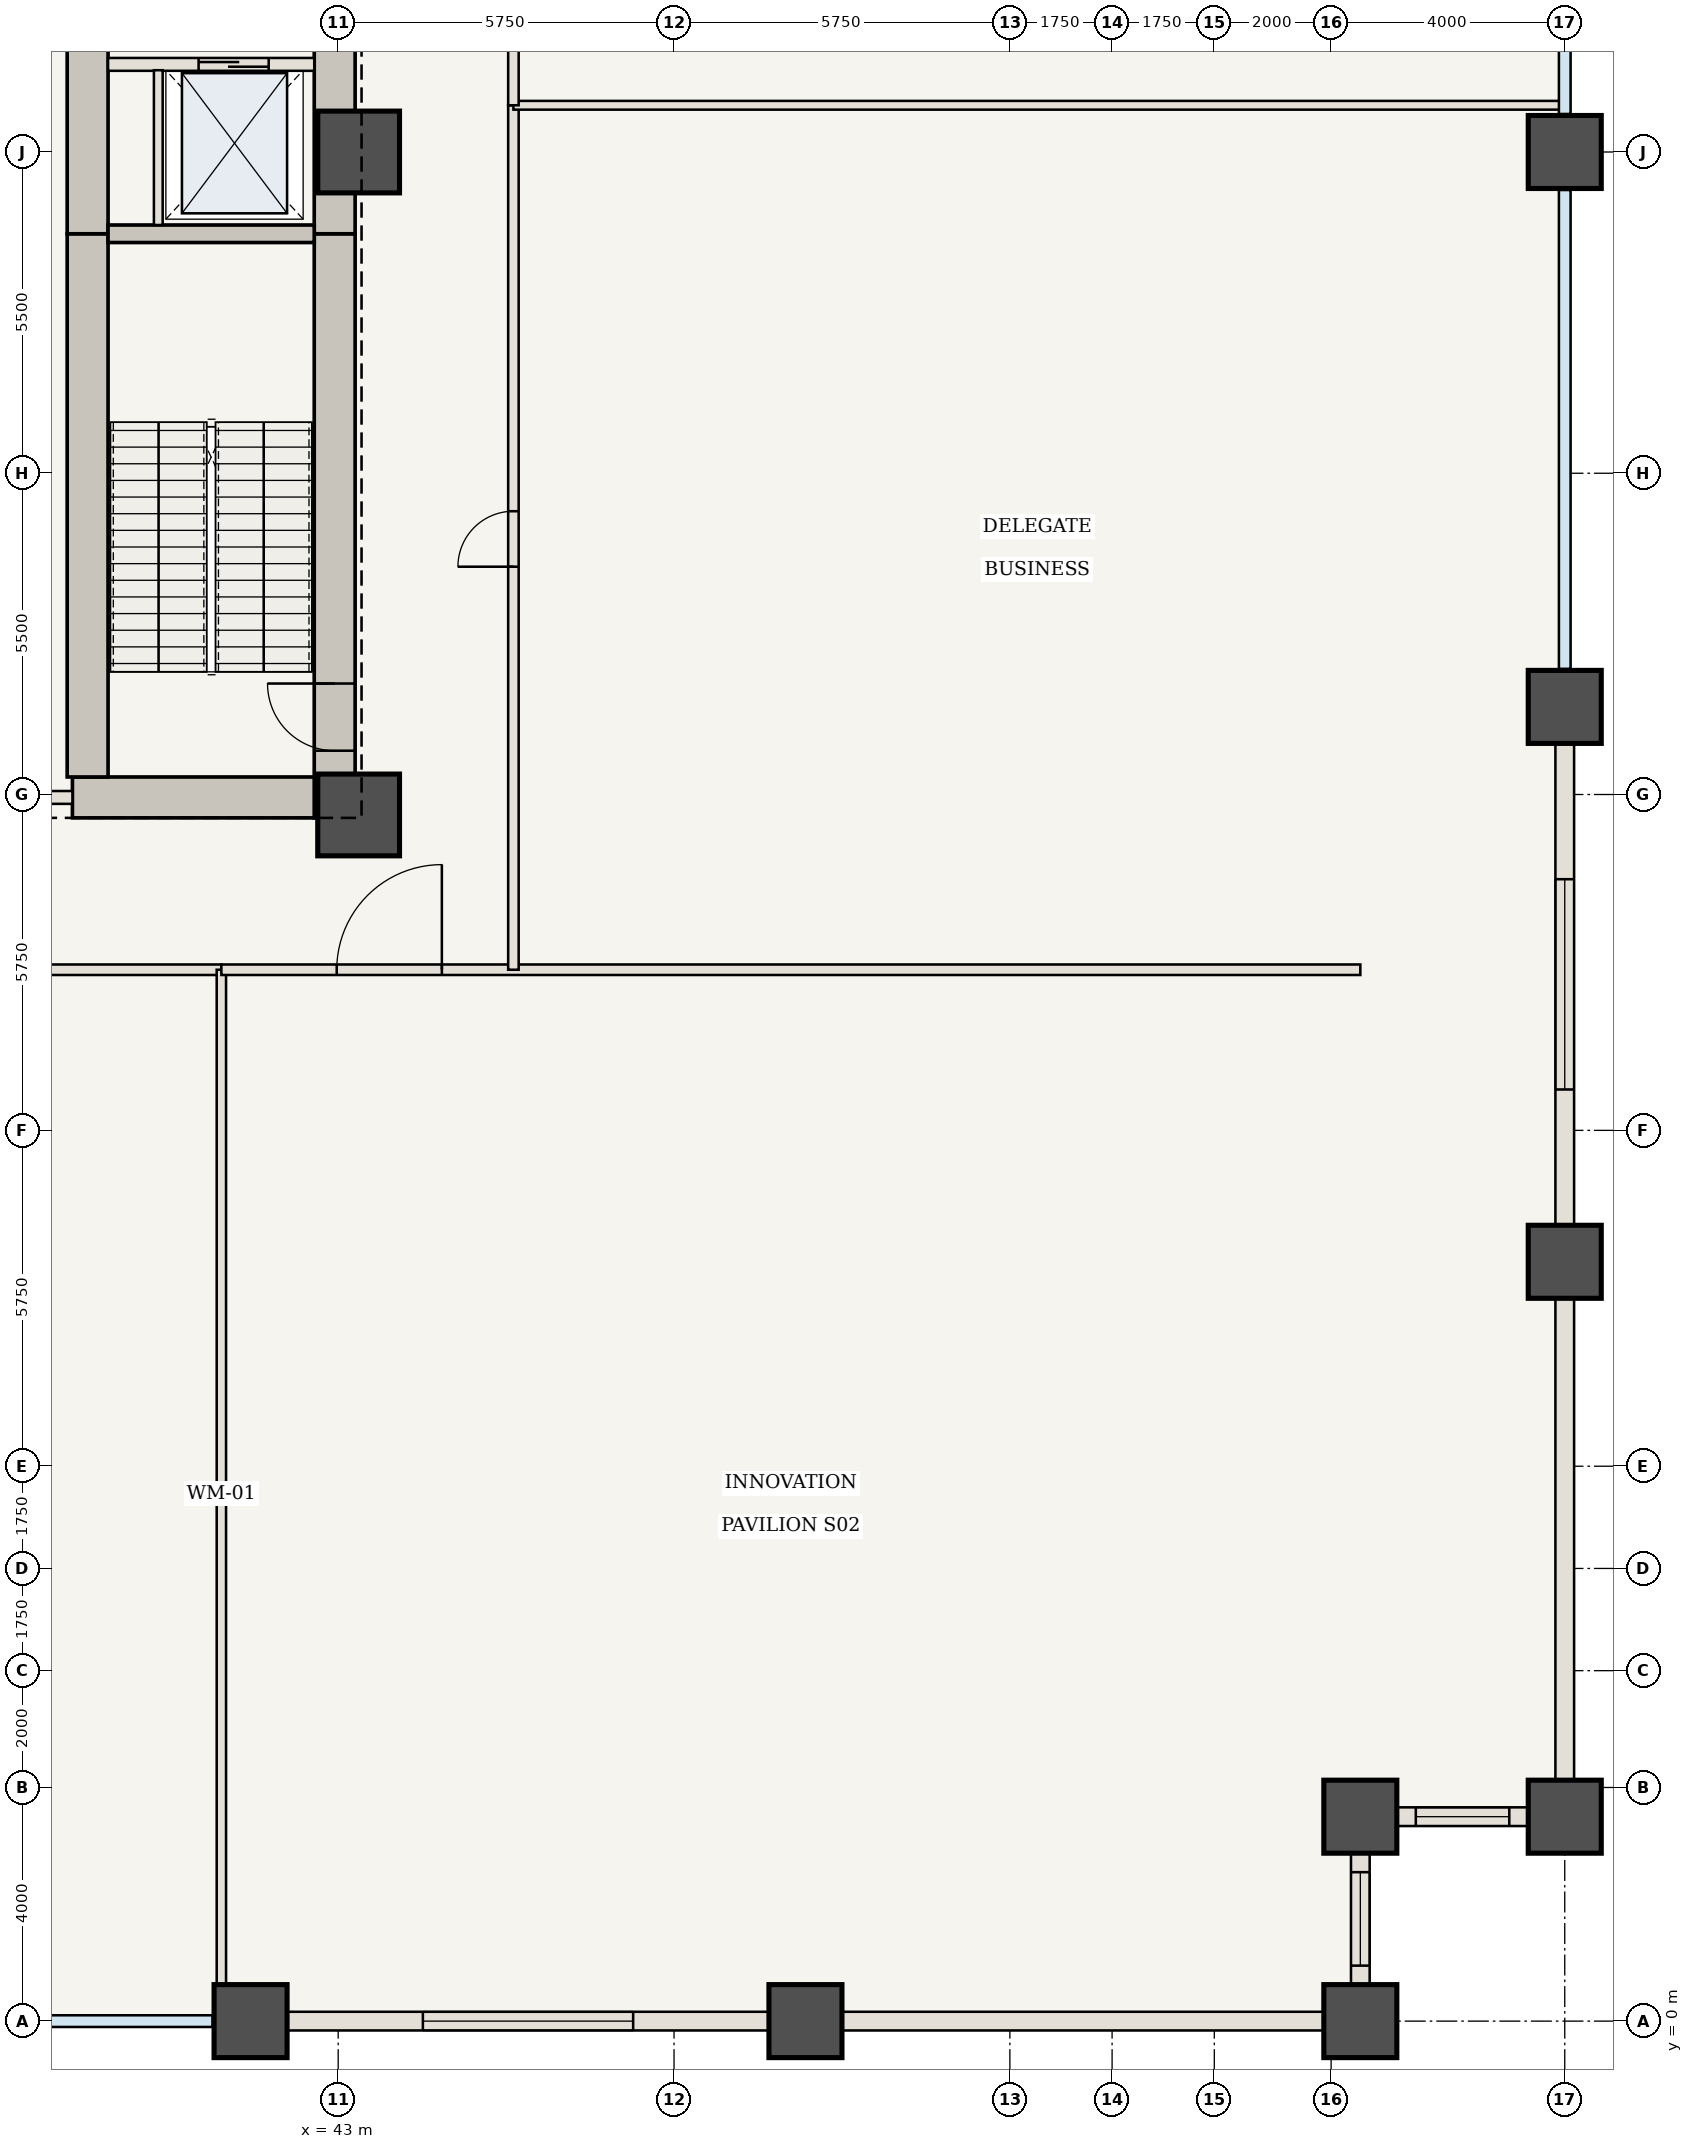
"""IFC4 building model, lengths in metres.
Left out: names, types, materials, properties, quantities, classifications, styles, units other than length and angle.
Written with IfcOpenShell. Run it as: python <this file> out.ifc"""

import sys

from ifc_helpers import new_model, si_unit, direction, frame, frame_2d, origin, origin_2d, place, context, subcontext, project, spatial, rectangle, extrude, element, fill, save


model = new_model("IFC4")
c1 = context("Model", 3, precision=1e-05, world=origin(), true_north=direction((0.0, 1.0)))
c2 = subcontext(c1, "Body", "Model", "MODEL_VIEW")
j1 = project(units=[si_unit("LENGTHUNIT", "METRE"), si_unit("PLANEANGLEUNIT", "RADIAN")], contexts=[c1])
p1 = place(None, origin())
s1 = spatial("IfcSite", under=j1, at=p1, CompositionType="ELEMENT")
p2 = place(p1, origin())
s2 = spatial("IfcBuilding", under=s1, at=p2, CompositionType="ELEMENT")
p3 = place(p2, frame((0.0, 0.0, 12.25)))
s3 = spatial("IfcBuildingStorey", under=s2, at=p3, CompositionType="ELEMENT", Elevation=12.25)
p4 = place(p3, frame((42.94, 20.6, 0.0), z_axis=(0.0, 0.0, 1.0), x_axis=(0.0, 1.0, 0.0)))
e1 = element("IfcWall", 1, at=p4, inside=s3, PredefinedType="SHEAR", context=c2, shape_type="SweptSolid", body=[
    extrude(rectangle(XDim=10.0, YDim=0.7, at=frame_2d((5.0, 0.0))), origin(), (0.0, 0.0, 1.0), 5.6),
])
p5 = place(p4, frame((1.15, 0.0, 0.0)))
e2 = element("IfcOpeningElement", 2, at=p5, cuts=e1, PredefinedType="OPENING", context=c2, shape_type="SweptSolid", body=[
    extrude(rectangle(XDim=1.15, YDim=2.15, at=frame_2d((0.575, 1.075))), frame((0.0, 0.36, 0.0), z_axis=(0.0, -1.0, 0.0), x_axis=(1.0, 0.0, 0.0)), (0.0, 0.0, 1.0), 0.72),
])
p6 = place(p3, frame((42.94, 30.6, 0.0), z_axis=(0.0, 0.0, 1.0), x_axis=(0.0, 1.0, 0.0)))
e3 = element("IfcWall", 3, at=p6, inside=s3, PredefinedType="SHEAR", context=c2, shape_type="SweptSolid", body=[
    extrude(rectangle(XDim=12.75, YDim=0.7, at=frame_2d((6.375, 0.0))), origin(), (0.0, 0.0, 1.0), 5.6),
])
p7 = place(p6, frame((4.2, 0.0, 0.0)))
e4 = element("IfcOpeningElement", 4, at=p7, cuts=e3, PredefinedType="OPENING", context=c2, shape_type="SweptSolid", body=[
    extrude(rectangle(XDim=1.1, YDim=2.15, at=frame_2d((0.55, 1.075))), frame((0.0, 0.36, 0.0), z_axis=(0.0, -1.0, 0.0), x_axis=(1.0, 0.0, 0.0)), (0.0, 0.0, 1.0), 0.72),
])
p8 = place(p6, frame((9.2, 0.0, 0.0)))
e5 = element("IfcOpeningElement", 5, at=p8, cuts=e3, PredefinedType="OPENING", context=c2, shape_type="SweptSolid", body=[
    extrude(rectangle(XDim=0.92, YDim=2.1, at=frame_2d((0.46, 1.05))), frame((0.0, 0.36, 0.0), z_axis=(0.0, -1.0, 0.0), x_axis=(1.0, 0.0, 0.0)), (0.0, 0.0, 1.0), 0.72),
])
p9 = place(p3, frame((38.45, 20.95, 0.0), z_axis=(0.0, 0.0, 1.0), x_axis=(1.0, 0.0, 0.0)))
e6 = element("IfcWall", 6, at=p9, inside=s3, PredefinedType="SHEAR", context=c2, shape_type="SweptSolid", body=[
    extrude(rectangle(XDim=4.14, YDim=0.7, at=frame_2d((2.07, 0.0))), origin(), (0.0, 0.0, 1.0), 5.6),
])
p10 = place(p3, frame((38.71, 21.3, 0.0), z_axis=(0.0, 0.0, 1.0), x_axis=(0.0, 1.0, 0.0)))
e7 = element("IfcWall", 7, at=p10, inside=s3, PredefinedType="SHEAR", context=c2, shape_type="SweptSolid", body=[
    extrude(rectangle(XDim=9.3, YDim=0.7, at=frame_2d((4.65, 0.0))), origin(), (0.0, 0.0, 1.0), 5.6),
])
p11 = place(p3, frame((38.71, 30.6, 0.0), z_axis=(0.0, 0.0, 1.0), x_axis=(0.0, 1.0, 0.0)))
e8 = element("IfcWall", 8, at=p11, inside=s3, PredefinedType="SHEAR", context=c2, shape_type="SweptSolid", body=[
    extrude(rectangle(XDim=12.05, YDim=0.7, at=frame_2d((6.025, 0.0))), origin(), (0.0, 0.0, 1.0), 5.6),
])
for number, where, z_axis, x_axis in (
    (9, (43.35, 20.65, 0.0), (0.0, 0.0, 1.0), (1.0, 0.0, 0.0)),
    (10, (43.35, 32.0, 0.0), (0.0, 0.0, 1.0), (1.0, 0.0, 0.0)),
):
    element("IfcColumn", number, at=place(p3, frame(where, z_axis=z_axis, x_axis=x_axis)), inside=s3, PredefinedType="COLUMN", context=c2, shape_type="SweptSolid", body=[
        extrude(rectangle(XDim=1.4, YDim=1.4, at=origin_2d()), origin(), (0.0, 0.0, 1.0), 5.6),
    ])
for number, where, z_axis, x_axis in (
    (11, (60.5, 0.0, 0.0), (0.0, 0.0, 1.0), (1.0, 0.0, 0.0)),
    (12, (60.5, 3.5, 0.0), (0.0, 0.0, 1.0), (1.0, 0.0, 0.0)),
    (13, (64.0, 3.5, 0.0), (0.0, 0.0, 1.0), (1.0, 0.0, 0.0)),
    (14, (64.0, 13.0, 0.0), (0.0, 0.0, 1.0), (1.0, 0.0, 0.0)),
    (15, (64.0, 22.5, 0.0), (0.0, 0.0, 1.0), (1.0, 0.0, 0.0)),
    (16, (64.0, 32.0, 0.0), (0.0, 0.0, 1.0), (1.0, 0.0, 0.0)),
    (17, (41.5, 0.0, 0.0), (0.0, 0.0, 1.0), (1.0, 0.0, 0.0)),
    (18, (51.0, 0.0, 0.0), (0.0, 0.0, 1.0), (1.0, 0.0, 0.0)),
):
    element("IfcColumn", number, at=place(p3, frame(where, z_axis=z_axis, x_axis=x_axis)), inside=s3, PredefinedType="COLUMN", context=c2, shape_type="SweptSolid", body=[
        extrude(rectangle(XDim=1.25, YDim=1.25, at=origin_2d()), origin(), (0.0, 0.0, 1.0), 5.6),
    ])
p12 = place(p3, frame((39.06, 30.6, 0.0), z_axis=(0.0, 0.0, 1.0), x_axis=(1.0, 0.0, 0.0)))
e19 = element("IfcWall", 19, at=p12, inside=s3, PredefinedType="SHEAR", context=c2, shape_type="SweptSolid", body=[
    extrude(rectangle(XDim=3.53, YDim=0.3, at=frame_2d((1.765, 0.0))), origin(), (0.0, 0.0, 1.0), 5.36),
])
p13 = place(p3, frame((39.06, 33.5, 0.0), z_axis=(0.0, 0.0, 1.0), x_axis=(1.0, 0.0, 0.0)))
e20 = element("IfcWall", 20, at=p13, inside=s3, PredefinedType="STANDARD", context=c2, shape_type="SweptSolid", body=[
    extrude(rectangle(XDim=3.53, YDim=0.22, at=frame_2d((1.765, 0.0))), origin(), (0.0, 0.0, 1.0), 5.36),
])
p14 = place(p13, frame((1.55, 0.0, 0.0)))
e21 = element("IfcOpeningElement", 21, at=p14, cuts=e20, PredefinedType="OPENING", context=c2, shape_type="SweptSolid", body=[
    extrude(rectangle(XDim=1.2, YDim=2.2, at=frame_2d((0.6, 1.1))), frame((0.0, 0.12, 0.0), z_axis=(0.0, -1.0, 0.0), x_axis=(1.0, 0.0, 0.0)), (0.0, 0.0, 1.0), 0.24),
])
p15 = place(p3, frame((39.92, 30.75, 0.0), z_axis=(0.0, 0.0, 1.0), x_axis=(0.0, 1.0, 0.0)))
e22 = element("IfcWall", 22, at=p15, inside=s3, PredefinedType="STANDARD", context=c2, shape_type="SweptSolid", body=[
    extrude(rectangle(XDim=2.65, YDim=0.15, at=frame_2d((1.325, 0.0))), origin(), (0.0, 0.0, 1.0), 5.36),
])
p16 = place(p3, frame((35.15, 20.95, 0.0), z_axis=(0.0, 0.0, 1.0), x_axis=(1.0, 0.0, 0.0)))
e23 = element("IfcWall", 23, at=p16, inside=s3, PredefinedType="STANDARD", context=c2, shape_type="SweptSolid", body=[
    extrude(rectangle(XDim=3.3, YDim=0.22, at=frame_2d((1.65, 0.0))), origin(), (0.0, 0.0, 1.0), 5.36),
])
p17 = place(p16, frame((1.1, 0.0, 0.0)))
e24 = element("IfcOpeningElement", 24, at=p17, cuts=e23, PredefinedType="OPENING", context=c2, shape_type="SweptSolid", body=[
    extrude(rectangle(XDim=1.1, YDim=2.15, at=frame_2d((0.55, 1.075))), frame((0.0, 0.12, 0.0), z_axis=(0.0, -1.0, 0.0), x_axis=(1.0, 0.0, 0.0)), (0.0, 0.0, 1.0), 0.24),
])
p18 = place(p3, frame((15.65, 18.0, 0.0), z_axis=(0.0, 0.0, 1.0), x_axis=(1.0, 0.0, 0.0)))
e25 = element("IfcWall", 25, at=p18, inside=s3, PredefinedType="STANDARD", context=c2, shape_type="SweptSolid", body=[
    extrude(rectangle(XDim=25.35, YDim=0.18, at=frame_2d((12.675, 0.0))), origin(), (0.0, 0.0, 1.0), 5.36),
])
p19 = place(p18, frame((14.825, 0.0, 0.0)))
e26 = element("IfcOpeningElement", 26, at=p19, cuts=e25, PredefinedType="OPENING", context=c2, shape_type="SweptSolid", body=[
    extrude(rectangle(XDim=1.8, YDim=2.35, at=frame_2d((0.9, 1.175))), frame((0.0, 0.1, 0.0), z_axis=(0.0, -1.0, 0.0), x_axis=(1.0, 0.0, 0.0)), (0.0, 0.0, 1.0), 0.2),
])
p20 = place(p3, frame((41.0, 0.06, 0.0), z_axis=(0.0, 0.0, 1.0), x_axis=(0.0, 1.0, 0.0)))
e27 = element("IfcWall", 27, at=p20, inside=s3, PredefinedType="MOVABLE", context=c2, shape_type="SweptSolid", body=[
    extrude(rectangle(XDim=17.94, YDim=0.16, at=frame_2d((8.97, 0.0))), origin(), (0.0, 0.0, 1.0), 5.36),
])
p21 = place(p3, frame((41.0, 18.0, 0.0), z_axis=(0.0, 0.0, 1.0), x_axis=(1.0, 0.0, 0.0)))
e28 = element("IfcWall", 28, at=p21, inside=s3, PredefinedType="STANDARD", context=c2, shape_type="SweptSolid", body=[
    extrude(rectangle(XDim=19.5, YDim=0.18, at=frame_2d((9.75, 0.0))), origin(), (0.0, 0.0, 1.0), 5.36),
])
p22 = place(p21, frame((1.975, 0.0, 0.0)))
e29 = element("IfcOpeningElement", 29, at=p22, cuts=e28, PredefinedType="OPENING", context=c2, shape_type="SweptSolid", body=[
    extrude(rectangle(XDim=1.8, YDim=2.35, at=frame_2d((0.9, 1.175))), frame((0.0, 0.1, 0.0), z_axis=(0.0, -1.0, 0.0), x_axis=(1.0, 0.0, 0.0)), (0.0, 0.0, 1.0), 0.2),
])
p23 = place(p3, frame((46.0, 18.0, 0.0), z_axis=(0.0, 0.0, 1.0), x_axis=(0.0, 1.0, 0.0)))
e30 = element("IfcWall", 30, at=p23, inside=s3, PredefinedType="STANDARD", context=c2, shape_type="SweptSolid", body=[
    extrude(rectangle(XDim=14.8, YDim=0.18, at=frame_2d((7.4, 0.0))), origin(), (0.0, 0.0, 1.0), 5.36),
])
p24 = place(p23, frame((6.9, 0.0, 0.0)))
e31 = element("IfcOpeningElement", 31, at=p24, cuts=e30, PredefinedType="OPENING", context=c2, shape_type="SweptSolid", body=[
    extrude(rectangle(XDim=0.95, YDim=2.15, at=frame_2d((0.475, 1.075))), frame((0.0, 0.1, 0.0), z_axis=(0.0, -1.0, 0.0), x_axis=(1.0, 0.0, 0.0)), (0.0, 0.0, 1.0), 0.2),
])
p25 = place(p3, frame((46.0, 32.8, 0.0), z_axis=(0.0, 0.0, 1.0), x_axis=(1.0, 0.0, 0.0)))
e32 = element("IfcWall", 32, at=p25, inside=s3, PredefinedType="STANDARD", context=c2, shape_type="SweptSolid", body=[
    extrude(rectangle(XDim=17.94, YDim=0.15, at=frame_2d((8.97, 0.0))), origin(), (0.0, 0.0, 1.0), 5.36),
])
p26 = place(p3, frame((46.0, 32.8, 0.0), z_axis=(0.0, 0.0, 1.0), x_axis=(0.0, 1.0, 0.0)))
e33 = element("IfcWall", 33, at=p26, inside=s3, PredefinedType="STANDARD", context=c2, shape_type="SweptSolid", body=[
    extrude(rectangle(XDim=13.2, YDim=0.18, at=frame_2d((6.6, 0.0))), origin(), (0.0, 0.0, 1.0), 5.36),
])
p27 = place(p26, frame((6.1, 0.0, 0.0)))
e34 = element("IfcOpeningElement", 34, at=p27, cuts=e33, PredefinedType="OPENING", context=c2, shape_type="SweptSolid", body=[
    extrude(rectangle(XDim=0.95, YDim=2.15, at=frame_2d((0.475, 1.075))), frame((0.0, 0.1, 0.0), z_axis=(0.0, -1.0, 0.0), x_axis=(1.0, 0.0, 0.0)), (0.0, 0.0, 1.0), 0.2),
])
p28 = place(p3, frame((51.0, 0.0, 0.0), z_axis=(0.0, 0.0, 1.0), x_axis=(-1.0, 0.0, 0.0)))
e35 = element("IfcWall", 35, at=p28, inside=s3, PredefinedType="USERDEFINED", context=c2, shape_type="SweptSolid", body=[
    extrude(rectangle(XDim=9.5, YDim=0.32, at=frame_2d((4.75, 0.0))), origin(), (0.0, 0.0, 1.0), 4.46),
])
p29 = place(p28, frame((2.95, 0.0, 0.85)))
e36 = element("IfcOpeningElement", 36, at=p29, cuts=e35, PredefinedType="OPENING", context=c2, shape_type="SweptSolid", body=[
    extrude(rectangle(XDim=3.6, YDim=2.6, at=frame_2d((1.8, 1.3))), frame((0.0, 0.17, 0.0), z_axis=(0.0, -1.0, 0.0), x_axis=(1.0, 0.0, 0.0)), (0.0, 0.0, 1.0), 0.34),
])
for number, where, z_axis, x_axis in (
    (37, (60.5, 0.0, 0.0), (0.0, 0.0, 1.0), (-1.0, 0.0, 0.0)),
    (38, (64.0, 13.0, 0.0), (0.0, 0.0, 1.0), (0.0, -1.0, 0.0)),
):
    element("IfcWall", number, at=place(p3, frame(where, z_axis=z_axis, x_axis=x_axis)), inside=s3, PredefinedType="USERDEFINED", context=c2, shape_type="SweptSolid", body=[
        extrude(rectangle(XDim=9.5, YDim=0.32, at=frame_2d((4.75, 0.0))), origin(), (0.0, 0.0, 1.0), 4.46),
    ])
p30 = place(p3, frame((64.0, 22.5, 0.0), z_axis=(0.0, 0.0, 1.0), x_axis=(0.0, -1.0, 0.0)))
e39 = element("IfcWall", 39, at=p30, inside=s3, PredefinedType="USERDEFINED", context=c2, shape_type="SweptSolid", body=[
    extrude(rectangle(XDim=9.5, YDim=0.32, at=frame_2d((4.75, 0.0))), origin(), (0.0, 0.0, 1.0), 4.46),
])
p31 = place(p30, frame((2.95, 0.0, 0.85)))
e40 = element("IfcOpeningElement", 40, at=p31, cuts=e39, PredefinedType="OPENING", context=c2, shape_type="SweptSolid", body=[
    extrude(rectangle(XDim=3.6, YDim=2.6, at=frame_2d((1.8, 1.3))), frame((0.0, 0.17, 0.0), z_axis=(0.0, -1.0, 0.0), x_axis=(1.0, 0.0, 0.0)), (0.0, 0.0, 1.0), 0.34),
])
p32 = place(p3, frame((60.5, 3.5, 0.0), z_axis=(0.0, 0.0, 1.0), x_axis=(0.0, -1.0, 0.0)))
e41 = element("IfcWall", 41, at=p32, inside=s3, PredefinedType="USERDEFINED", context=c2, shape_type="SweptSolid", body=[
    extrude(rectangle(XDim=3.5, YDim=0.32, at=frame_2d((1.75, 0.0))), origin(), (0.0, 0.0, 1.0), 4.46),
])
p33 = place(p32, frame((0.95, 0.0, 0.85)))
e42 = element("IfcOpeningElement", 42, at=p33, cuts=e41, PredefinedType="OPENING", context=c2, shape_type="SweptSolid", body=[
    extrude(rectangle(XDim=1.6, YDim=2.05, at=frame_2d((0.8, 1.025))), frame((0.0, 0.17, 0.0), z_axis=(0.0, -1.0, 0.0), x_axis=(1.0, 0.0, 0.0)), (0.0, 0.0, 1.0), 0.34),
])
p34 = place(p3, frame((64.0, 3.5, 0.0), z_axis=(0.0, 0.0, 1.0), x_axis=(-1.0, 0.0, 0.0)))
e43 = element("IfcWall", 43, at=p34, inside=s3, PredefinedType="USERDEFINED", context=c2, shape_type="SweptSolid", body=[
    extrude(rectangle(XDim=3.5, YDim=0.32, at=frame_2d((1.75, 0.0))), origin(), (0.0, 0.0, 1.0), 4.46),
])
p35 = place(p34, frame((0.95, 0.0, 0.85)))
e44 = element("IfcOpeningElement", 44, at=p35, cuts=e43, PredefinedType="OPENING", context=c2, shape_type="SweptSolid", body=[
    extrude(rectangle(XDim=1.6, YDim=2.05, at=frame_2d((0.8, 1.025))), frame((0.0, 0.17, 0.0), z_axis=(0.0, -1.0, 0.0), x_axis=(1.0, 0.0, 0.0)), (0.0, 0.0, 1.0), 0.34),
])
p36 = place(p5, origin())
e45 = element("IfcDoor", 45, at=p36, inside=s3, OperationType="SINGLE_SWING_RIGHT", PredefinedType="DOOR", context=c2, shape_type="SweptSolid", body=[
    extrude(rectangle(XDim=1.15, YDim=2.15, at=frame_2d((0.575, 1.075))), frame((0.0, 0.025, 0.0), z_axis=(0.0, -1.0, 0.0), x_axis=(1.0, 0.0, 0.0)), (0.0, 0.0, 1.0), 0.05),
])
fill(e2, e45)
p37 = place(p14, origin())
e46 = element("IfcDoor", 46, at=p37, inside=s3, OperationType="DOUBLE_DOOR_SLIDING", PredefinedType="DOOR", context=c2, shape_type="SweptSolid", body=[
    extrude(rectangle(XDim=1.2, YDim=2.2, at=frame_2d((0.6, 1.1))), frame((0.0, 0.025, 0.0), z_axis=(0.0, -1.0, 0.0), x_axis=(1.0, 0.0, 0.0)), (0.0, 0.0, 1.0), 0.05),
])
fill(e21, e46)
p38 = place(p22, origin())
e47 = element("IfcDoor", 47, at=p38, inside=s3, OperationType="SINGLE_SWING_RIGHT", PredefinedType="DOOR", context=c2, shape_type="SweptSolid", body=[
    extrude(rectangle(XDim=1.8, YDim=2.35, at=frame_2d((0.9, 1.175))), frame((0.0, 0.025, 0.0), z_axis=(0.0, -1.0, 0.0), x_axis=(1.0, 0.0, 0.0)), (0.0, 0.0, 1.0), 0.05),
])
fill(e29, e47)
p39 = place(p24, origin())
e48 = element("IfcDoor", 48, at=p39, inside=s3, OperationType="SINGLE_SWING_LEFT", PredefinedType="DOOR", context=c2, shape_type="SweptSolid", body=[
    extrude(rectangle(XDim=0.95, YDim=2.15, at=frame_2d((0.475, 1.075))), frame((0.0, 0.025, 0.0), z_axis=(0.0, -1.0, 0.0), x_axis=(1.0, 0.0, 0.0)), (0.0, 0.0, 1.0), 0.05),
])
fill(e31, e48)
p40 = place(p29, origin())
e49 = element("IfcWindow", 49, at=p40, inside=s3, PartitioningType="SINGLE_PANEL", PredefinedType="WINDOW", context=c2, shape_type="SweptSolid", body=[
    extrude(rectangle(XDim=3.6, YDim=2.6, at=frame_2d((1.8, 1.3))), frame((0.0, 0.03, 0.0), z_axis=(0.0, -1.0, 0.0), x_axis=(1.0, 0.0, 0.0)), (0.0, 0.0, 1.0), 0.06),
])
fill(e36, e49)
p41 = place(p31, origin())
e50 = element("IfcWindow", 50, at=p41, inside=s3, PartitioningType="SINGLE_PANEL", PredefinedType="WINDOW", context=c2, shape_type="SweptSolid", body=[
    extrude(rectangle(XDim=3.6, YDim=2.6, at=frame_2d((1.8, 1.3))), frame((0.0, 0.03, 0.0), z_axis=(0.0, -1.0, 0.0), x_axis=(1.0, 0.0, 0.0)), (0.0, 0.0, 1.0), 0.06),
])
fill(e40, e50)
p42 = place(p33, origin())
e51 = element("IfcWindow", 51, at=p42, inside=s3, PartitioningType="SINGLE_PANEL", PredefinedType="WINDOW", context=c2, shape_type="SweptSolid", body=[
    extrude(rectangle(XDim=1.6, YDim=2.05, at=frame_2d((0.8, 1.025))), frame((0.0, 0.03, 0.0), z_axis=(0.0, -1.0, 0.0), x_axis=(1.0, 0.0, 0.0)), (0.0, 0.0, 1.0), 0.06),
])
fill(e42, e51)
p43 = place(p35, origin())
e52 = element("IfcWindow", 52, at=p43, inside=s3, PartitioningType="SINGLE_PANEL", PredefinedType="WINDOW", context=c2, shape_type="SweptSolid", body=[
    extrude(rectangle(XDim=1.6, YDim=2.05, at=frame_2d((0.8, 1.025))), frame((0.0, 0.03, 0.0), z_axis=(0.0, -1.0, 0.0), x_axis=(1.0, 0.0, 0.0)), (0.0, 0.0, 1.0), 0.06),
])
fill(e44, e52)
save(model, sys.argv[1])
